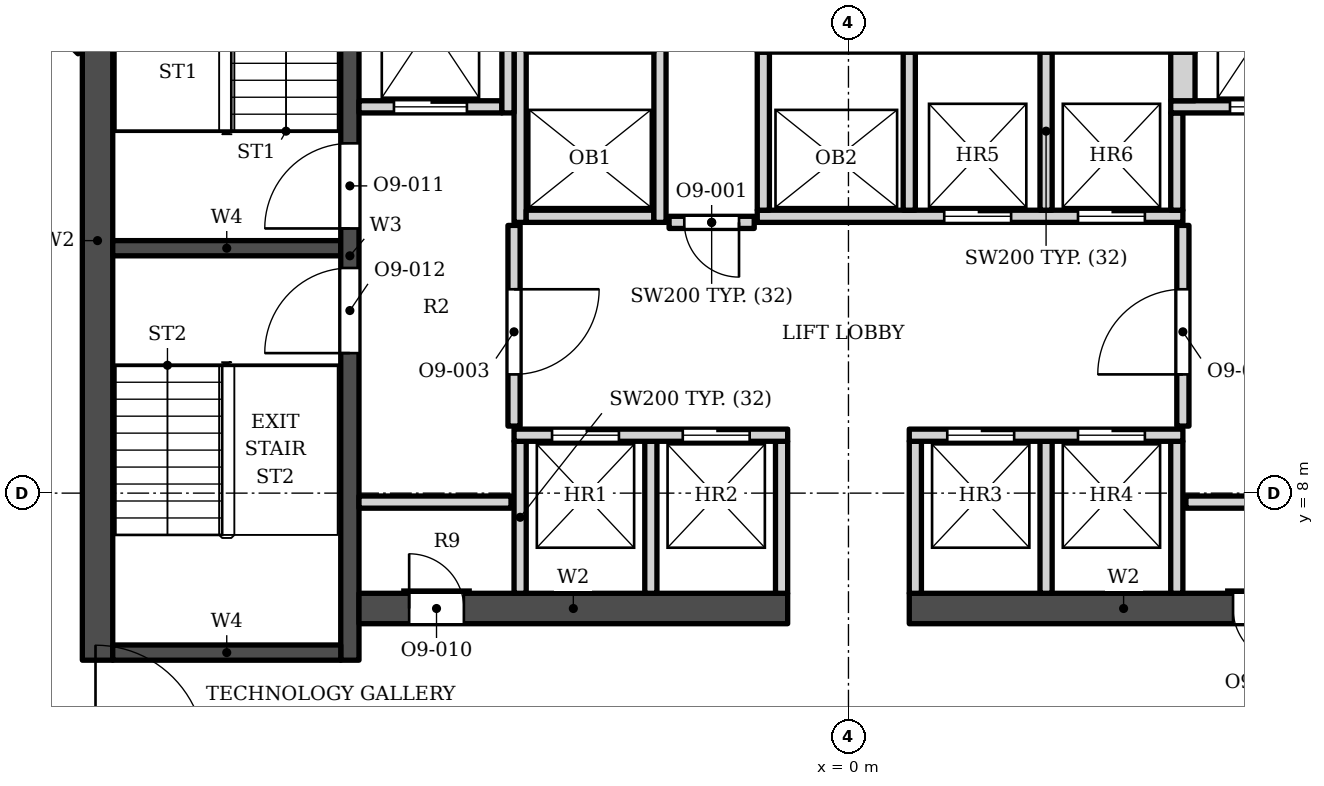
"""IFC4 building model, lengths in metres.
Left out: names, types, materials, properties, quantities, classifications, styles, units other than length and angle.
Written with IfcOpenShell. Run it as: python <this file> out.ifc"""

import sys

from ifc_helpers import new_model, si_unit, direction, frame, frame_2d, origin, place, context, subcontext, project, spatial, rectangle, extrude, element, fill, save


model = new_model("IFC4")
c1 = context("Model", 3, precision=1e-05, world=origin(), true_north=direction((0.0, 1.0)))
c2 = subcontext(c1, "Body", "Model", "MODEL_VIEW")
j1 = project(units=[si_unit("LENGTHUNIT", "METRE"), si_unit("PLANEANGLEUNIT", "RADIAN")], contexts=[c1])
p1 = place(None, origin())
s1 = spatial("IfcSite", under=j1, at=p1, CompositionType="ELEMENT")
p2 = place(p1, origin())
s2 = spatial("IfcBuilding", under=s1, at=p2, CompositionType="ELEMENT")
p3 = place(p2, frame((0.0, 0.0, 248.2)))
s3 = spatial("IfcBuildingStorey", under=s2, at=p3, CompositionType="ELEMENT", Elevation=248.2)
p4 = place(p3, frame((-12.35, 5.253, 0.0), z_axis=(0.0, 0.0, 1.0), x_axis=(0.0, 1.0, 0.0)))
e1 = element("IfcWall", 1, at=p4, inside=s3, PredefinedType="SHEAR", context=c2, shape_type="SweptSolid", body=[
    extrude(rectangle(XDim=13.8, YDim=0.5, at=frame_2d((6.9, 0.0))), origin(), (0.0, 0.0, 1.0), 3.9),
])
p5 = place(p3, frame((-8.2, 5.253, 0.0), z_axis=(0.0, 0.0, 1.0), x_axis=(0.0, 1.0, 0.0)))
e2 = element("IfcWall", 2, at=p5, inside=s3, PredefinedType="SHEAR", context=c2, shape_type="SweptSolid", body=[
    extrude(rectangle(XDim=13.3, YDim=0.3, at=frame_2d((6.65, 0.0))), origin(), (0.0, 0.0, 1.0), 3.9),
])
p6 = place(p5, frame((7.1, 0.0, 0.0)))
e3 = element("IfcOpeningElement", 3, at=p6, cuts=e2, PredefinedType="OPENING", context=c2, shape_type="SweptSolid", body=[
    extrude(rectangle(XDim=1.4, YDim=2.1, at=frame_2d((0.7, 1.05))), frame((0.0, 0.16, 0.0), z_axis=(0.0, -1.0, 0.0), x_axis=(1.0, 0.0, 0.0)), (0.0, 0.0, 1.0), 0.32),
])
p7 = place(p5, frame((5.05, 0.0, 0.0)))
e4 = element("IfcOpeningElement", 4, at=p7, cuts=e2, PredefinedType="OPENING", context=c2, shape_type="SweptSolid", body=[
    extrude(rectangle(XDim=1.4, YDim=2.1, at=frame_2d((0.7, 1.05))), frame((0.0, 0.16, 0.0), z_axis=(0.0, -1.0, 0.0), x_axis=(1.0, 0.0, 0.0)), (0.0, 0.0, 1.0), 0.32),
])
for number, where, z_axis, x_axis in (
    (5, (-12.1, 12.028, 0.0), (0.0, 0.0, 1.0), (1.0, 0.0, 0.0)),
    (6, (-12.1, 5.378, 0.0), (0.0, 0.0, 1.0), (1.0, 0.0, 0.0)),
):
    element("IfcWall", number, at=place(p3, frame(where, z_axis=z_axis, x_axis=x_axis)), inside=s3, PredefinedType="SHEAR", context=c2, shape_type="SweptSolid", body=[
        extrude(rectangle(XDim=3.75, YDim=0.25, at=frame_2d((1.875, 0.0))), origin(), (0.0, 0.0, 1.0), 3.9),
    ])
p8 = place(p3, frame((-8.05, 6.103, 0.0), z_axis=(0.0, 0.0, 1.0), x_axis=(1.0, 0.0, 0.0)))
e7 = element("IfcWall", 7, at=p8, inside=s3, PredefinedType="SHEAR", context=c2, shape_type="SweptSolid", body=[
    extrude(rectangle(XDim=7.05, YDim=0.5, at=frame_2d((3.525, 0.0))), origin(), (0.0, 0.0, 1.0), 3.9),
])
p9 = place(p8, frame((0.825, 0.0, 0.0)))
e8 = element("IfcOpeningElement", 8, at=p9, cuts=e7, PredefinedType="OPENING", context=c2, shape_type="SweptSolid", body=[
    extrude(rectangle(XDim=0.9, YDim=2.1, at=frame_2d((0.45, 1.05))), frame((0.0, 0.26, 0.0), z_axis=(0.0, -1.0, 0.0), x_axis=(1.0, 0.0, 0.0)), (0.0, 0.0, 1.0), 0.52),
])
p10 = place(p3, frame((1.0, 6.103, 0.0), z_axis=(0.0, 0.0, 1.0), x_axis=(1.0, 0.0, 0.0)))
e9 = element("IfcWall", 9, at=p10, inside=s3, PredefinedType="SHEAR", context=c2, shape_type="SweptSolid", body=[
    extrude(rectangle(XDim=7.05, YDim=0.5, at=frame_2d((3.525, 0.0))), origin(), (0.0, 0.0, 1.0), 3.9),
])
p11 = place(p10, frame((5.325, 0.0, 0.0)))
e10 = element("IfcOpeningElement", 10, at=p11, cuts=e9, PredefinedType="OPENING", context=c2, shape_type="SweptSolid", body=[
    extrude(rectangle(XDim=0.9, YDim=2.1, at=frame_2d((0.45, 1.05))), frame((0.0, 0.26, 0.0), z_axis=(0.0, -1.0, 0.0), x_axis=(1.0, 0.0, 0.0)), (0.0, 0.0, 1.0), 0.52),
])
for number, where, z_axis, x_axis in (
    (11, (-5.4, 6.353, 0.0), (0.0, 0.0, 1.0), (0.0, 1.0, 0.0)),
    (12, (-3.25, 6.353, 0.0), (0.0, 0.0, 1.0), (0.0, 1.0, 0.0)),
    (13, (-1.1, 6.353, 0.0), (0.0, 0.0, 1.0), (0.0, 1.0, 0.0)),
    (14, (1.1, 6.353, 0.0), (0.0, 0.0, 1.0), (0.0, 1.0, 0.0)),
    (15, (3.25, 6.353, 0.0), (0.0, 0.0, 1.0), (0.0, 1.0, 0.0)),
    (16, (5.4, 6.353, 0.0), (0.0, 0.0, 1.0), (0.0, 1.0, 0.0)),
    (17, (-8.05, 7.853, 0.0), (0.0, 0.0, 1.0), (1.0, 0.0, 0.0)),
    (18, (5.55, 7.853, 0.0), (0.0, 0.0, 1.0), (1.0, 0.0, 0.0)),
):
    element("IfcWall", number, at=place(p3, frame(where, z_axis=z_axis, x_axis=x_axis)), inside=s3, PredefinedType="SOLIDWALL", context=c2, shape_type="SweptSolid", body=[
        extrude(rectangle(XDim=2.5, YDim=0.2, at=frame_2d((1.25, 0.0))), origin(), (0.0, 0.0, 1.0), 3.73),
    ])
p12 = place(p3, frame((-5.5, 8.953, 0.0), z_axis=(0.0, 0.0, 1.0), x_axis=(1.0, 0.0, 0.0)))
e19 = element("IfcWall", 19, at=p12, inside=s3, PredefinedType="SOLIDWALL", context=c2, shape_type="SweptSolid", body=[
    extrude(rectangle(XDim=4.5, YDim=0.2, at=frame_2d((2.25, 0.0))), origin(), (0.0, 0.0, 1.0), 3.73),
])
p13 = place(p12, frame((0.625, 0.0, 0.0)))
e20 = element("IfcOpeningElement", 20, at=p13, cuts=e19, PredefinedType="OPENING", context=c2, shape_type="SweptSolid", body=[
    extrude(rectangle(XDim=1.1, YDim=2.1, at=frame_2d((0.55, 1.05))), frame((0.0, 0.11, 0.0), z_axis=(0.0, -1.0, 0.0), x_axis=(1.0, 0.0, 0.0)), (0.0, 0.0, 1.0), 0.22),
])
p14 = place(p12, frame((2.775, 0.0, 0.0)))
e21 = element("IfcOpeningElement", 21, at=p14, cuts=e19, PredefinedType="OPENING", context=c2, shape_type="SweptSolid", body=[
    extrude(rectangle(XDim=1.1, YDim=2.1, at=frame_2d((0.55, 1.05))), frame((0.0, 0.11, 0.0), z_axis=(0.0, -1.0, 0.0), x_axis=(1.0, 0.0, 0.0)), (0.0, 0.0, 1.0), 0.22),
])
p15 = place(p3, frame((1.0, 8.953, 0.0), z_axis=(0.0, 0.0, 1.0), x_axis=(1.0, 0.0, 0.0)))
e22 = element("IfcWall", 22, at=p15, inside=s3, PredefinedType="SOLIDWALL", context=c2, shape_type="SweptSolid", body=[
    extrude(rectangle(XDim=4.5, YDim=0.2, at=frame_2d((2.25, 0.0))), origin(), (0.0, 0.0, 1.0), 3.73),
])
p16 = place(p15, frame((0.625, 0.0, 0.0)))
e23 = element("IfcOpeningElement", 23, at=p16, cuts=e22, PredefinedType="OPENING", context=c2, shape_type="SweptSolid", body=[
    extrude(rectangle(XDim=1.1, YDim=2.1, at=frame_2d((0.55, 1.05))), frame((0.0, 0.11, 0.0), z_axis=(0.0, -1.0, 0.0), x_axis=(1.0, 0.0, 0.0)), (0.0, 0.0, 1.0), 0.22),
])
p17 = place(p15, frame((2.775, 0.0, 0.0)))
e24 = element("IfcOpeningElement", 24, at=p17, cuts=e22, PredefinedType="OPENING", context=c2, shape_type="SweptSolid", body=[
    extrude(rectangle(XDim=1.1, YDim=2.1, at=frame_2d((0.55, 1.05))), frame((0.0, 0.11, 0.0), z_axis=(0.0, -1.0, 0.0), x_axis=(1.0, 0.0, 0.0)), (0.0, 0.0, 1.0), 0.22),
])
p18 = place(p3, frame((-5.5, 9.103, 0.0), z_axis=(0.0, 0.0, 1.0), x_axis=(0.0, 1.0, 0.0)))
e25 = element("IfcWall", 25, at=p18, inside=s3, PredefinedType="SOLIDWALL", context=c2, shape_type="SweptSolid", body=[
    extrude(rectangle(XDim=3.3, YDim=0.2, at=frame_2d((1.65, 0.0))), origin(), (0.0, 0.0, 1.0), 3.73),
])
p19 = place(p18, frame((0.85, 0.0, 0.0)))
e26 = element("IfcOpeningElement", 26, at=p19, cuts=e25, PredefinedType="OPENING", context=c2, shape_type="SweptSolid", body=[
    extrude(rectangle(XDim=1.4, YDim=2.1, at=frame_2d((0.7, 1.05))), frame((0.0, 0.11, 0.0), z_axis=(0.0, -1.0, 0.0), x_axis=(1.0, 0.0, 0.0)), (0.0, 0.0, 1.0), 0.22),
])
p20 = place(p3, frame((5.5, 9.103, 0.0), z_axis=(0.0, 0.0, 1.0), x_axis=(0.0, 1.0, 0.0)))
e27 = element("IfcWall", 27, at=p20, inside=s3, PredefinedType="SOLIDWALL", context=c2, shape_type="SweptSolid", body=[
    extrude(rectangle(XDim=3.3, YDim=0.2, at=frame_2d((1.65, 0.0))), origin(), (0.0, 0.0, 1.0), 3.73),
])
p21 = place(p20, frame((0.85, 0.0, 0.0)))
e28 = element("IfcOpeningElement", 28, at=p21, cuts=e27, PredefinedType="OPENING", context=c2, shape_type="SweptSolid", body=[
    extrude(rectangle(XDim=1.4, YDim=2.1, at=frame_2d((0.7, 1.05))), frame((0.0, 0.11, 0.0), z_axis=(0.0, -1.0, 0.0), x_axis=(1.0, 0.0, 0.0)), (0.0, 0.0, 1.0), 0.22),
])
p22 = place(p3, frame((-2.95, 12.453, 0.0), z_axis=(0.0, 0.0, 1.0), x_axis=(1.0, 0.0, 0.0)))
e29 = element("IfcWall", 29, at=p22, inside=s3, PredefinedType="SOLIDWALL", context=c2, shape_type="SweptSolid", body=[
    extrude(rectangle(XDim=1.4, YDim=0.2, at=frame_2d((0.7, 0.0))), origin(), (0.0, 0.0, 1.0), 3.73),
])
p23 = place(p22, frame((0.25, 0.0, 0.0)))
e30 = element("IfcOpeningElement", 30, at=p23, cuts=e29, PredefinedType="OPENING", context=c2, shape_type="SweptSolid", body=[
    extrude(rectangle(XDim=0.9, YDim=2.1, at=frame_2d((0.45, 1.05))), frame((0.0, 0.11, 0.0), z_axis=(0.0, -1.0, 0.0), x_axis=(1.0, 0.0, 0.0)), (0.0, 0.0, 1.0), 0.22),
])
p24 = place(p3, frame((-5.4, 12.453, 0.0), z_axis=(0.0, 0.0, 1.0), x_axis=(0.0, 1.0, 0.0)))
e31 = element("IfcWall", 31, at=p24, inside=s3, PredefinedType="SOLIDWALL", context=c2, shape_type="SweptSolid", body=[
    extrude(rectangle(XDim=3.0, YDim=0.2, at=frame_2d((1.5, 0.0))), origin(), (0.0, 0.0, 1.0), 3.73),
])
p25 = place(p3, frame((-5.3, 12.552, 0.0), z_axis=(0.0, 0.0, 1.0), x_axis=(1.0, 0.0, 0.0)))
e32 = element("IfcWall", 32, at=p25, inside=s3, PredefinedType="SOLIDWALL", context=c2, shape_type="SweptSolid", body=[
    extrude(rectangle(XDim=2.1, YDim=0.2, at=frame_2d((1.05, 0.0))), origin(), (0.0, 0.0, 1.0), 3.73),
])
p26 = place(p3, frame((-3.1, 12.453, 0.0), z_axis=(0.0, 0.0, 1.0), x_axis=(0.0, 1.0, 0.0)))
e33 = element("IfcWall", 33, at=p26, inside=s3, PredefinedType="SOLIDWALL", context=c2, shape_type="SweptSolid", body=[
    extrude(rectangle(XDim=3.0, YDim=0.2, at=frame_2d((1.5, 0.0))), origin(), (0.0, 0.0, 1.0), 3.73),
])
p27 = place(p3, frame((-1.5, 12.552, 0.0), z_axis=(0.0, 0.0, 1.0), x_axis=(1.0, 0.0, 0.0)))
e34 = element("IfcWall", 34, at=p27, inside=s3, PredefinedType="SOLIDWALL", context=c2, shape_type="SweptSolid", body=[
    extrude(rectangle(XDim=7.0, YDim=0.2, at=frame_2d((3.5, 0.0))), origin(), (0.0, 0.0, 1.0), 3.73),
])
p28 = place(p27, frame((3.075, 0.0, 0.0)))
e35 = element("IfcOpeningElement", 35, at=p28, cuts=e34, PredefinedType="OPENING", context=c2, shape_type="SweptSolid", body=[
    extrude(rectangle(XDim=1.1, YDim=2.1, at=frame_2d((0.55, 1.05))), frame((0.0, 0.11, 0.0), z_axis=(0.0, -1.0, 0.0), x_axis=(1.0, 0.0, 0.0)), (0.0, 0.0, 1.0), 0.22),
])
p29 = place(p27, frame((5.275, 0.0, 0.0)))
e36 = element("IfcOpeningElement", 36, at=p29, cuts=e34, PredefinedType="OPENING", context=c2, shape_type="SweptSolid", body=[
    extrude(rectangle(XDim=1.1, YDim=2.1, at=frame_2d((0.55, 1.05))), frame((0.0, 0.11, 0.0), z_axis=(0.0, -1.0, 0.0), x_axis=(1.0, 0.0, 0.0)), (0.0, 0.0, 1.0), 0.22),
])
for number, where, z_axis, x_axis in (
    (37, (-1.4, 12.653, 0.0), (0.0, 0.0, 1.0), (0.0, 1.0, 0.0)),
    (38, (1.0, 12.653, 0.0), (0.0, 0.0, 1.0), (0.0, 1.0, 0.0)),
    (39, (3.25, 12.653, 0.0), (0.0, 0.0, 1.0), (0.0, 1.0, 0.0)),
):
    element("IfcWall", number, at=place(p3, frame(where, z_axis=z_axis, x_axis=x_axis)), inside=s3, PredefinedType="SOLIDWALL", context=c2, shape_type="SweptSolid", body=[
        extrude(rectangle(XDim=2.6, YDim=0.2, at=frame_2d((1.3, 0.0))), origin(), (0.0, 0.0, 1.0), 3.73),
    ])
p30 = place(p3, frame((5.4, 12.653, 0.0), z_axis=(0.0, 0.0, 1.0), x_axis=(0.0, 1.0, 0.0)))
e40 = element("IfcWall", 40, at=p30, inside=s3, PredefinedType="SOLIDWALL", context=c2, shape_type="SweptSolid", body=[
    extrude(rectangle(XDim=1.6, YDim=0.2, at=frame_2d((0.8, 0.0))), origin(), (0.0, 0.0, 1.0), 3.73),
])
p31 = place(p3, frame((-8.05, 14.353, 0.0), z_axis=(0.0, 0.0, 1.0), x_axis=(1.0, 0.0, 0.0)))
e41 = element("IfcWall", 41, at=p31, inside=s3, PredefinedType="SOLIDWALL", context=c2, shape_type="SweptSolid", body=[
    extrude(rectangle(XDim=2.35, YDim=0.2, at=frame_2d((1.175, 0.0))), origin(), (0.0, 0.0, 1.0), 3.73),
])
p32 = place(p31, frame((0.575, 0.0, 0.0)))
e42 = element("IfcOpeningElement", 42, at=p32, cuts=e41, PredefinedType="OPENING", context=c2, shape_type="SweptSolid", body=[
    extrude(rectangle(XDim=1.2, YDim=2.1, at=frame_2d((0.6, 1.05))), frame((0.0, 0.11, 0.0), z_axis=(0.0, -1.0, 0.0), x_axis=(1.0, 0.0, 0.0)), (0.0, 0.0, 1.0), 0.22),
])
p33 = place(p3, frame((-5.6, 14.253, 0.0), z_axis=(0.0, 0.0, 1.0), x_axis=(0.0, 1.0, 0.0)))
e43 = element("IfcWall", 43, at=p33, inside=s3, PredefinedType="SOLIDWALL", context=c2, shape_type="SweptSolid", body=[
    extrude(rectangle(XDim=4.3, YDim=0.2, at=frame_2d((2.15, 0.0))), origin(), (0.0, 0.0, 1.0), 3.73),
])
p34 = place(p3, frame((5.3, 14.353, 0.0), z_axis=(0.0, 0.0, 1.0), x_axis=(1.0, 0.0, 0.0)))
e44 = element("IfcWall", 44, at=p34, inside=s3, PredefinedType="SOLIDWALL", context=c2, shape_type="SweptSolid", body=[
    extrude(rectangle(XDim=2.75, YDim=0.2, at=frame_2d((1.375, 0.0))), origin(), (0.0, 0.0, 1.0), 3.73),
])
p35 = place(p34, frame((0.975, 0.0, 0.0)))
e45 = element("IfcOpeningElement", 45, at=p35, cuts=e44, PredefinedType="OPENING", context=c2, shape_type="SweptSolid", body=[
    extrude(rectangle(XDim=1.2, YDim=2.1, at=frame_2d((0.6, 1.05))), frame((0.0, 0.11, 0.0), z_axis=(0.0, -1.0, 0.0), x_axis=(1.0, 0.0, 0.0)), (0.0, 0.0, 1.0), 0.22),
])
p36 = place(p3, frame((5.5, 14.453, 0.0), z_axis=(0.0, 0.0, 1.0), x_axis=(0.0, 1.0, 0.0)))
e46 = element("IfcWall", 46, at=p36, inside=s3, PredefinedType="SOLIDWALL", context=c2, shape_type="SweptSolid", body=[
    extrude(rectangle(XDim=0.8, YDim=0.4, at=frame_2d((0.4, 0.0))), origin(), (0.0, 0.0, 1.0), 3.73),
])
p37 = place(p3, frame((-5.3, 15.353, 0.0), z_axis=(0.0, 0.0, 1.0), x_axis=(1.0, 0.0, 0.0)))
e47 = element("IfcWall", 47, at=p37, inside=s3, PredefinedType="SOLIDWALL", context=c2, shape_type="SweptSolid", body=[
    extrude(rectangle(XDim=2.1, YDim=0.2, at=frame_2d((1.05, 0.0))), origin(), (0.0, 0.0, 1.0), 3.73),
])
p38 = place(p3, frame((-1.5, 15.353, 0.0), z_axis=(0.0, 0.0, 1.0), x_axis=(1.0, 0.0, 0.0)))
e48 = element("IfcWall", 48, at=p38, inside=s3, PredefinedType="SOLIDWALL", context=c2, shape_type="SweptSolid", body=[
    extrude(rectangle(XDim=7.2, YDim=0.2, at=frame_2d((3.6, 0.0))), origin(), (0.0, 0.0, 1.0), 3.73),
])
p39 = place(p3, frame((-13.26, 15.953, 0.0), z_axis=(0.0, 0.0, 1.0), x_axis=(0.708285399161, -0.705926195389, 0.0)))
e49 = element("IfcWall", 49, at=p39, inside=s3, PredefinedType="PARTITIONING", context=c2, shape_type="SweptSolid", body=[
    extrude(rectangle(XDim=0.931, YDim=0.2, at=frame_2d((0.466, 0.0))), origin(), (0.0, 0.0, 1.0), 3.73),
])
p40 = place(p13, origin())
e50 = element("IfcDoor", 50, at=p40, inside=s3, OperationType="DOUBLE_DOOR_SLIDING", PredefinedType="DOOR", context=c2, shape_type="SweptSolid", body=[
    extrude(rectangle(XDim=1.1, YDim=2.1, at=frame_2d((0.55, 1.05))), frame((0.0, 0.025, 0.0), z_axis=(0.0, -1.0, 0.0), x_axis=(1.0, 0.0, 0.0)), (0.0, 0.0, 1.0), 0.05),
])
fill(e20, e50)
p41 = place(p14, origin())
e51 = element("IfcDoor", 51, at=p41, inside=s3, OperationType="DOUBLE_DOOR_SLIDING", PredefinedType="DOOR", context=c2, shape_type="SweptSolid", body=[
    extrude(rectangle(XDim=1.1, YDim=2.1, at=frame_2d((0.55, 1.05))), frame((0.0, 0.025, 0.0), z_axis=(0.0, -1.0, 0.0), x_axis=(1.0, 0.0, 0.0)), (0.0, 0.0, 1.0), 0.05),
])
fill(e21, e51)
p42 = place(p16, origin())
e52 = element("IfcDoor", 52, at=p42, inside=s3, OperationType="DOUBLE_DOOR_SLIDING", PredefinedType="DOOR", context=c2, shape_type="SweptSolid", body=[
    extrude(rectangle(XDim=1.1, YDim=2.1, at=frame_2d((0.55, 1.05))), frame((0.0, 0.025, 0.0), z_axis=(0.0, -1.0, 0.0), x_axis=(1.0, 0.0, 0.0)), (0.0, 0.0, 1.0), 0.05),
])
fill(e23, e52)
p43 = place(p17, origin())
e53 = element("IfcDoor", 53, at=p43, inside=s3, OperationType="DOUBLE_DOOR_SLIDING", PredefinedType="DOOR", context=c2, shape_type="SweptSolid", body=[
    extrude(rectangle(XDim=1.1, YDim=2.1, at=frame_2d((0.55, 1.05))), frame((0.0, 0.025, 0.0), z_axis=(0.0, -1.0, 0.0), x_axis=(1.0, 0.0, 0.0)), (0.0, 0.0, 1.0), 0.05),
])
fill(e24, e53)
p44 = place(p28, origin())
e54 = element("IfcDoor", 54, at=p44, inside=s3, OperationType="DOUBLE_DOOR_SLIDING", PredefinedType="DOOR", context=c2, shape_type="SweptSolid", body=[
    extrude(rectangle(XDim=1.1, YDim=2.1, at=frame_2d((0.55, 1.05))), frame((0.0, 0.025, 0.0), z_axis=(0.0, -1.0, 0.0), x_axis=(1.0, 0.0, 0.0)), (0.0, 0.0, 1.0), 0.05),
])
fill(e35, e54)
p45 = place(p29, origin())
e55 = element("IfcDoor", 55, at=p45, inside=s3, OperationType="DOUBLE_DOOR_SLIDING", PredefinedType="DOOR", context=c2, shape_type="SweptSolid", body=[
    extrude(rectangle(XDim=1.1, YDim=2.1, at=frame_2d((0.55, 1.05))), frame((0.0, 0.025, 0.0), z_axis=(0.0, -1.0, 0.0), x_axis=(1.0, 0.0, 0.0)), (0.0, 0.0, 1.0), 0.05),
])
fill(e36, e55)
p46 = place(p32, origin())
e56 = element("IfcDoor", 56, at=p46, inside=s3, OperationType="DOUBLE_DOOR_SLIDING", PredefinedType="DOOR", context=c2, shape_type="SweptSolid", body=[
    extrude(rectangle(XDim=1.2, YDim=2.1, at=frame_2d((0.6, 1.05))), frame((0.0, 0.025, 0.0), z_axis=(0.0, -1.0, 0.0), x_axis=(1.0, 0.0, 0.0)), (0.0, 0.0, 1.0), 0.05),
])
fill(e42, e56)
p47 = place(p35, origin())
e57 = element("IfcDoor", 57, at=p47, inside=s3, OperationType="DOUBLE_DOOR_SLIDING", PredefinedType="DOOR", context=c2, shape_type="SweptSolid", body=[
    extrude(rectangle(XDim=1.2, YDim=2.1, at=frame_2d((0.6, 1.05))), frame((0.0, 0.025, 0.0), z_axis=(0.0, -1.0, 0.0), x_axis=(1.0, 0.0, 0.0)), (0.0, 0.0, 1.0), 0.05),
])
fill(e45, e57)
p48 = place(p6, origin())
e58 = element("IfcDoor", 58, at=p48, inside=s3, OperationType="SINGLE_SWING_LEFT", PredefinedType="DOOR", context=c2, shape_type="SweptSolid", body=[
    extrude(rectangle(XDim=1.4, YDim=2.1, at=frame_2d((0.7, 1.05))), frame((0.0, 0.025, 0.0), z_axis=(0.0, -1.0, 0.0), x_axis=(1.0, 0.0, 0.0)), (0.0, 0.0, 1.0), 0.05),
])
fill(e3, e58)
p49 = place(p7, origin())
e59 = element("IfcDoor", 59, at=p49, inside=s3, OperationType="SINGLE_SWING_LEFT", PredefinedType="DOOR", context=c2, shape_type="SweptSolid", body=[
    extrude(rectangle(XDim=1.4, YDim=2.1, at=frame_2d((0.7, 1.05))), frame((0.0, 0.025, 0.0), z_axis=(0.0, -1.0, 0.0), x_axis=(1.0, 0.0, 0.0)), (0.0, 0.0, 1.0), 0.05),
])
fill(e4, e59)
p50 = place(p23, origin())
e60 = element("IfcDoor", 60, at=p50, inside=s3, OperationType="SINGLE_SWING_RIGHT", PredefinedType="DOOR", context=c2, shape_type="SweptSolid", body=[
    extrude(rectangle(XDim=0.9, YDim=2.1, at=frame_2d((0.45, 1.05))), frame((0.0, 0.025, 0.0), z_axis=(0.0, -1.0, 0.0), x_axis=(1.0, 0.0, 0.0)), (0.0, 0.0, 1.0), 0.05),
])
fill(e30, e60)
p51 = place(p19, origin())
e61 = element("IfcDoor", 61, at=p51, inside=s3, OperationType="SINGLE_SWING_RIGHT", PredefinedType="DOOR", context=c2, shape_type="SweptSolid", body=[
    extrude(rectangle(XDim=1.4, YDim=2.1, at=frame_2d((0.7, 1.05))), frame((0.0, 0.025, 0.0), z_axis=(0.0, -1.0, 0.0), x_axis=(1.0, 0.0, 0.0)), (0.0, 0.0, 1.0), 0.05),
])
fill(e26, e61)
p52 = place(p21, origin())
e62 = element("IfcDoor", 62, at=p52, inside=s3, OperationType="SINGLE_SWING_LEFT", PredefinedType="DOOR", context=c2, shape_type="SweptSolid", body=[
    extrude(rectangle(XDim=1.4, YDim=2.1, at=frame_2d((0.7, 1.05))), frame((0.0, 0.025, 0.0), z_axis=(0.0, -1.0, 0.0), x_axis=(1.0, 0.0, 0.0)), (0.0, 0.0, 1.0), 0.05),
])
fill(e28, e62)
p53 = place(p9, origin())
e63 = element("IfcDoor", 63, at=p53, inside=s3, OperationType="SINGLE_SWING_LEFT", PredefinedType="DOOR", context=c2, shape_type="SweptSolid", body=[
    extrude(rectangle(XDim=0.9, YDim=2.1, at=frame_2d((0.45, 1.05))), frame((0.0, 0.025, 0.0), z_axis=(0.0, -1.0, 0.0), x_axis=(1.0, 0.0, 0.0)), (0.0, 0.0, 1.0), 0.05),
])
fill(e8, e63)
p54 = place(p11, origin())
e64 = element("IfcDoor", 64, at=p54, inside=s3, OperationType="SINGLE_SWING_RIGHT", PredefinedType="DOOR", context=c2, shape_type="SweptSolid", body=[
    extrude(rectangle(XDim=0.9, YDim=2.1, at=frame_2d((0.45, 1.05))), frame((0.0, 0.025, 0.0), z_axis=(0.0, -1.0, 0.0), x_axis=(1.0, 0.0, 0.0)), (0.0, 0.0, 1.0), 0.05),
])
fill(e10, e64)
save(model, sys.argv[1])
